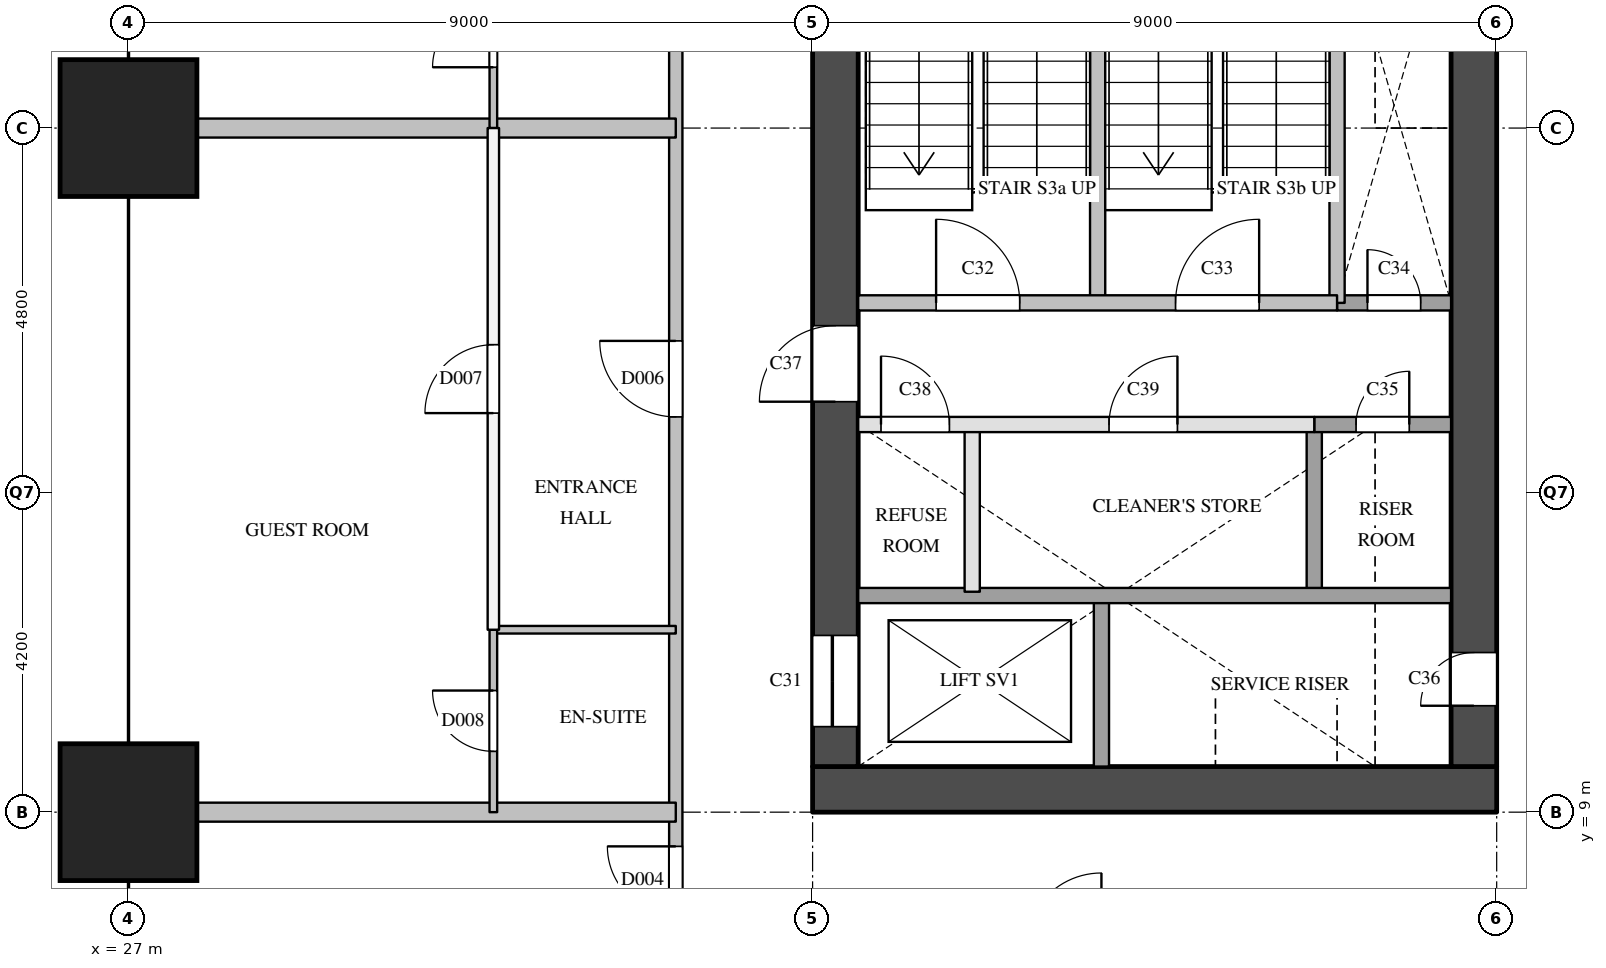
"""IFC4 building model, lengths in metres.
Left out: names, types, materials, properties, quantities, classifications, styles, units other than length and angle.
Written with IfcOpenShell. Run it as: python <this file> out.ifc"""

import sys

from ifc_helpers import new_model, si_unit, direction, frame, frame_2d, origin, origin_2d, place, context, subcontext, project, spatial, rectangle, extrude, element, fill, save


model = new_model("IFC4")
c1 = context("Model", 3, precision=1e-05, world=origin(), true_north=direction((0.0, 1.0)))
c2 = subcontext(c1, "Body", "Model", "MODEL_VIEW")
j1 = project(units=[si_unit("LENGTHUNIT", "METRE"), si_unit("PLANEANGLEUNIT", "RADIAN")], contexts=[c1])
p1 = place(None, origin())
s1 = spatial("IfcSite", under=j1, at=p1, CompositionType="ELEMENT")
p2 = place(p1, origin())
s2 = spatial("IfcBuilding", under=s1, at=p2, CompositionType="ELEMENT")
p3 = place(p2, frame((0.0, 0.0, 96.8)))
s3 = spatial("IfcBuildingStorey", under=s2, at=p3, CompositionType="ELEMENT", Elevation=96.8)
for number, where, z_axis, x_axis in (
    (1, (27.0, 9.0, 0.0), (0.0, 0.0, 1.0), (1.0, 0.0, 0.0)),
    (2, (27.0, 18.0, 0.0), (0.0, 0.0, 1.0), (1.0, 0.0, 0.0)),
):
    element("IfcColumn", number, at=place(p3, frame(where, z_axis=z_axis, x_axis=x_axis)), inside=s3, PredefinedType="COLUMN", context=c2, shape_type="SweptSolid", body=[
        extrude(rectangle(XDim=1.8, YDim=1.8, at=origin_2d()), origin(), (0.0, 0.0, 1.0), 3.8),
    ])
p4 = place(p3, frame((36.0, 9.3, 0.0), z_axis=(0.0, 0.0, 1.0), x_axis=(1.0, 0.0, 0.0)))
e3 = element("IfcWall", 3, at=p4, inside=s3, PredefinedType="SHEAR", context=c2, shape_type="SweptSolid", body=[
    extrude(rectangle(XDim=9.0, YDim=0.6, at=frame_2d((4.5, 0.0))), origin(), (0.0, 0.0, 1.0), 3.5),
])
p5 = place(p3, frame((36.3, 9.6, 0.0), z_axis=(0.0, 0.0, 1.0), x_axis=(0.0, 1.0, 0.0)))
e4 = element("IfcWall", 4, at=p5, inside=s3, PredefinedType="SHEAR", context=c2, shape_type="SweptSolid", body=[
    extrude(rectangle(XDim=12.3, YDim=0.6, at=frame_2d((6.15, 0.0))), origin(), (0.0, 0.0, 1.0), 3.5),
])
p6 = place(p5, frame((0.525, 0.0, 0.0)))
e5 = element("IfcOpeningElement", 5, at=p6, cuts=e4, PredefinedType="OPENING", context=c2, shape_type="SweptSolid", body=[
    extrude(rectangle(XDim=1.2, YDim=2.1, at=frame_2d((0.6, 1.05))), frame((0.0, 0.31, 0.0), z_axis=(0.0, -1.0, 0.0), x_axis=(1.0, 0.0, 0.0)), (0.0, 0.0, 1.0), 0.62),
])
p7 = place(p5, frame((4.8, 0.0, 0.0)))
e6 = element("IfcOpeningElement", 6, at=p7, cuts=e4, PredefinedType="OPENING", context=c2, shape_type="SweptSolid", body=[
    extrude(rectangle(XDim=1.0, YDim=2.1, at=frame_2d((0.5, 1.05))), frame((0.0, 0.31, 0.0), z_axis=(0.0, -1.0, 0.0), x_axis=(1.0, 0.0, 0.0)), (0.0, 0.0, 1.0), 0.62),
])
p8 = place(p3, frame((44.7, 9.6, 0.0), z_axis=(0.0, 0.0, 1.0), x_axis=(0.0, 1.0, 0.0)))
e7 = element("IfcWall", 7, at=p8, inside=s3, PredefinedType="SHEAR", context=c2, shape_type="SweptSolid", body=[
    extrude(rectangle(XDim=12.3, YDim=0.6, at=frame_2d((6.15, 0.0))), origin(), (0.0, 0.0, 1.0), 3.5),
])
p9 = place(p8, frame((0.8, 0.0, 0.0)))
e8 = element("IfcOpeningElement", 8, at=p9, cuts=e7, PredefinedType="OPENING", context=c2, shape_type="SweptSolid", body=[
    extrude(rectangle(XDim=0.7, YDim=2.1, at=frame_2d((0.35, 1.05))), frame((0.0, 0.31, 0.0), z_axis=(0.0, -1.0, 0.0), x_axis=(1.0, 0.0, 0.0)), (0.0, 0.0, 1.0), 0.62),
])
p10 = place(p3, frame((38.1, 11.9, 0.0), z_axis=(0.0, 0.0, 1.0), x_axis=(0.0, 1.0, 0.0)))
e9 = element("IfcWall", 9, at=p10, inside=s3, PredefinedType="PARTITIONING", context=c2, shape_type="SweptSolid", body=[
    extrude(rectangle(XDim=2.2, YDim=0.2, at=frame_2d((1.1, 0.0))), origin(), (0.0, 0.0, 1.0), 3.5),
])
p11 = place(p3, frame((39.75, 15.7, 0.0), z_axis=(0.0, 0.0, 1.0), x_axis=(0.0, 1.0, 0.0)))
e10 = element("IfcWall", 10, at=p11, inside=s3, PredefinedType="SOLIDWALL", context=c2, shape_type="SweptSolid", body=[
    extrude(rectangle(XDim=4.3, YDim=0.2, at=frame_2d((2.15, 0.0))), origin(), (0.0, 0.0, 1.0), 3.5),
])
p12 = place(p3, frame((39.8, 9.6, 0.0), z_axis=(0.0, 0.0, 1.0), x_axis=(0.0, 1.0, 0.0)))
e11 = element("IfcWall", 11, at=p12, inside=s3, PredefinedType="SOLIDWALL", context=c2, shape_type="SweptSolid", body=[
    extrude(rectangle(XDim=2.3, YDim=0.2, at=frame_2d((1.15, 0.0))), origin(), (0.0, 0.0, 1.0), 3.5),
])
p13 = place(p3, frame((42.6, 11.9, 0.0), z_axis=(0.0, 0.0, 1.0), x_axis=(0.0, 1.0, 0.0)))
e12 = element("IfcWall", 12, at=p13, inside=s3, PredefinedType="SOLIDWALL", context=c2, shape_type="SweptSolid", body=[
    extrude(rectangle(XDim=2.2, YDim=0.2, at=frame_2d((1.1, 0.0))), origin(), (0.0, 0.0, 1.0), 3.5),
])
p14 = place(p3, frame((42.9, 15.7, 0.0), z_axis=(0.0, 0.0, 1.0), x_axis=(0.0, 1.0, 0.0)))
e13 = element("IfcWall", 13, at=p14, inside=s3, PredefinedType="SOLIDWALL", context=c2, shape_type="SweptSolid", body=[
    extrude(rectangle(XDim=4.3, YDim=0.2, at=frame_2d((2.15, 0.0))), origin(), (0.0, 0.0, 1.0), 3.5),
])
p15 = place(p3, frame((36.6, 11.85, 0.0), z_axis=(0.0, 0.0, 1.0), x_axis=(1.0, 0.0, 0.0)))
e14 = element("IfcWall", 14, at=p15, inside=s3, PredefinedType="SOLIDWALL", context=c2, shape_type="SweptSolid", body=[
    extrude(rectangle(XDim=7.8, YDim=0.2, at=frame_2d((3.9, 0.0))), origin(), (0.0, 0.0, 1.0), 3.5),
])
p16 = place(p3, frame((36.6, 14.1, 0.0), z_axis=(0.0, 0.0, 1.0), x_axis=(1.0, 0.0, 0.0)))
e15 = element("IfcWall", 15, at=p16, inside=s3, PredefinedType="PARTITIONING", context=c2, shape_type="SweptSolid", body=[
    extrude(rectangle(XDim=6.0, YDim=0.2, at=frame_2d((3.0, 0.0))), origin(), (0.0, 0.0, 1.0), 3.5),
])
p17 = place(p16, frame((0.3, 0.0, 0.0)))
e16 = element("IfcOpeningElement", 16, at=p17, cuts=e15, PredefinedType="OPENING", context=c2, shape_type="SweptSolid", body=[
    extrude(rectangle(XDim=0.9, YDim=2.1, at=frame_2d((0.45, 1.05))), frame((0.0, 0.11, 0.0), z_axis=(0.0, -1.0, 0.0), x_axis=(1.0, 0.0, 0.0)), (0.0, 0.0, 1.0), 0.22),
])
p18 = place(p16, frame((3.3, 0.0, 0.0)))
e17 = element("IfcOpeningElement", 17, at=p18, cuts=e15, PredefinedType="OPENING", context=c2, shape_type="SweptSolid", body=[
    extrude(rectangle(XDim=0.9, YDim=2.1, at=frame_2d((0.45, 1.05))), frame((0.0, 0.11, 0.0), z_axis=(0.0, -1.0, 0.0), x_axis=(1.0, 0.0, 0.0)), (0.0, 0.0, 1.0), 0.22),
])
p19 = place(p3, frame((42.6, 14.1, 0.0), z_axis=(0.0, 0.0, 1.0), x_axis=(1.0, 0.0, 0.0)))
e18 = element("IfcWall", 18, at=p19, inside=s3, PredefinedType="SOLIDWALL", context=c2, shape_type="SweptSolid", body=[
    extrude(rectangle(XDim=1.8, YDim=0.2, at=frame_2d((0.9, 0.0))), origin(), (0.0, 0.0, 1.0), 3.5),
])
p20 = place(p19, frame((0.55, 0.0, 0.0)))
e19 = element("IfcOpeningElement", 19, at=p20, cuts=e18, PredefinedType="OPENING", context=c2, shape_type="SweptSolid", body=[
    extrude(rectangle(XDim=0.7, YDim=2.1, at=frame_2d((0.35, 1.05))), frame((0.0, 0.11, 0.0), z_axis=(0.0, -1.0, 0.0), x_axis=(1.0, 0.0, 0.0)), (0.0, 0.0, 1.0), 0.22),
])
p21 = place(p3, frame((42.9, 15.7, 0.0), z_axis=(0.0, 0.0, 1.0), x_axis=(1.0, 0.0, 0.0)))
e20 = element("IfcWall", 20, at=p21, inside=s3, PredefinedType="SOLIDWALL", context=c2, shape_type="SweptSolid", body=[
    extrude(rectangle(XDim=1.5, YDim=0.2, at=frame_2d((0.75, 0.0))), origin(), (0.0, 0.0, 1.0), 3.5),
])
p22 = place(p21, frame((0.4, 0.0, 0.0)))
e21 = element("IfcOpeningElement", 21, at=p22, cuts=e20, PredefinedType="OPENING", context=c2, shape_type="SweptSolid", body=[
    extrude(rectangle(XDim=0.7, YDim=2.1, at=frame_2d((0.35, 1.05))), frame((0.0, 0.11, 0.0), z_axis=(0.0, -1.0, 0.0), x_axis=(1.0, 0.0, 0.0)), (0.0, 0.0, 1.0), 0.22),
])
p23 = place(p3, frame((36.6, 15.7, 0.0), z_axis=(0.0, 0.0, 1.0), x_axis=(1.0, 0.0, 0.0)))
e22 = element("IfcWall", 22, at=p23, inside=s3, PredefinedType="SOLIDWALL", context=c2, shape_type="SweptSolid", body=[
    extrude(rectangle(XDim=6.3, YDim=0.2, at=frame_2d((3.15, 0.0))), origin(), (0.0, 0.0, 1.0), 3.5),
])
p24 = place(p23, frame((1.025, 0.0, 0.0)))
e23 = element("IfcOpeningElement", 23, at=p24, cuts=e22, PredefinedType="OPENING", context=c2, shape_type="SweptSolid", body=[
    extrude(rectangle(XDim=1.1, YDim=2.1, at=frame_2d((0.55, 1.05))), frame((0.0, 0.11, 0.0), z_axis=(0.0, -1.0, 0.0), x_axis=(1.0, 0.0, 0.0)), (0.0, 0.0, 1.0), 0.22),
])
p25 = place(p23, frame((4.175, 0.0, 0.0)))
e24 = element("IfcOpeningElement", 24, at=p25, cuts=e22, PredefinedType="OPENING", context=c2, shape_type="SweptSolid", body=[
    extrude(rectangle(XDim=1.1, YDim=2.1, at=frame_2d((0.55, 1.05))), frame((0.0, 0.11, 0.0), z_axis=(0.0, -1.0, 0.0), x_axis=(1.0, 0.0, 0.0)), (0.0, 0.0, 1.0), 0.22),
])
p26 = place(p3, frame((34.2, 7.2, 0.0), z_axis=(0.0, 0.0, 1.0), x_axis=(0.0, 1.0, 0.0)))
e25 = element("IfcWall", 25, at=p26, inside=s3, PredefinedType="PARTITIONING", context=c2, shape_type="SweptSolid", body=[
    extrude(rectangle(XDim=16.49, YDim=0.175, at=frame_2d((8.245, 0.0))), origin(), (0.0, 0.0, 1.0), 3.5),
])
p27 = place(p26, frame((0.45, 0.0, 0.0)))
e26 = element("IfcOpeningElement", 26, at=p27, cuts=e25, PredefinedType="OPENING", context=c2, shape_type="SweptSolid", body=[
    extrude(rectangle(XDim=0.9, YDim=2.1, at=frame_2d((0.45, 1.05))), frame((0.0, 0.097, 0.0), z_axis=(0.0, -1.0, 0.0), x_axis=(1.0, 0.0, 0.0)), (0.0, 0.0, 1.0), 0.195),
])
p28 = place(p26, frame((7.0, 0.0, 0.0)))
e27 = element("IfcOpeningElement", 27, at=p28, cuts=e25, PredefinedType="OPENING", context=c2, shape_type="SweptSolid", body=[
    extrude(rectangle(XDim=1.0, YDim=2.1, at=frame_2d((0.5, 1.05))), frame((0.0, 0.097, 0.0), z_axis=(0.0, -1.0, 0.0), x_axis=(1.0, 0.0, 0.0)), (0.0, 0.0, 1.0), 0.195),
])
p29 = place(p26, frame((14.345, 0.0, 0.0)))
e28 = element("IfcOpeningElement", 28, at=p29, cuts=e25, PredefinedType="OPENING", context=c2, shape_type="SweptSolid", body=[
    extrude(rectangle(XDim=1.0, YDim=2.1, at=frame_2d((0.5, 1.05))), frame((0.0, 0.097, 0.0), z_axis=(0.0, -1.0, 0.0), x_axis=(1.0, 0.0, 0.0)), (0.0, 0.0, 1.0), 0.195),
])
p30 = place(p3, frame((31.8, 11.4, 0.0), z_axis=(0.0, 0.0, 1.0), x_axis=(0.0, 1.0, 0.0)))
e29 = element("IfcWall", 29, at=p30, inside=s3, PredefinedType="PARTITIONING", context=c2, shape_type="SweptSolid", body=[
    extrude(rectangle(XDim=6.6, YDim=0.15, at=frame_2d((3.3, 0.0))), origin(), (0.0, 0.0, 1.0), 3.5),
])
p31 = place(p30, frame((2.85, 0.0, 0.0)))
e30 = element("IfcOpeningElement", 30, at=p31, cuts=e29, PredefinedType="OPENING", context=c2, shape_type="SweptSolid", body=[
    extrude(rectangle(XDim=0.9, YDim=2.1, at=frame_2d((0.45, 1.05))), frame((0.0, 0.085, 0.0), z_axis=(0.0, -1.0, 0.0), x_axis=(1.0, 0.0, 0.0)), (0.0, 0.0, 1.0), 0.17),
])
for number, where, z_axis, x_axis in (
    (31, (27.0, 9.0, 0.0), (0.0, 0.0, 1.0), (1.0, 0.0, 0.0)),
    (32, (27.0, 18.0, 0.0), (0.0, 0.0, 1.0), (1.0, 0.0, 0.0)),
):
    element("IfcWall", number, at=place(p3, frame(where, z_axis=z_axis, x_axis=x_axis)), inside=s3, PredefinedType="PARTITIONING", context=c2, shape_type="SweptSolid", body=[
        extrude(rectangle(XDim=7.2, YDim=0.25, at=frame_2d((3.6, 0.0))), origin(), (0.0, 0.0, 1.0), 3.5),
    ])
p32 = place(p3, frame((31.8, 11.4, 0.0), z_axis=(0.0, 0.0, 1.0), x_axis=(1.0, 0.0, 0.0)))
e33 = element("IfcWall", 33, at=p32, inside=s3, PredefinedType="PARTITIONING", context=c2, shape_type="SweptSolid", body=[
    extrude(rectangle(XDim=2.4, YDim=0.1, at=frame_2d((1.2, 0.0))), origin(), (0.0, 0.0, 1.0), 3.5),
])
p33 = place(p3, frame((31.8, 9.0, 0.0), z_axis=(0.0, 0.0, 1.0), x_axis=(0.0, 1.0, 0.0)))
e34 = element("IfcWall", 34, at=p33, inside=s3, PredefinedType="PARTITIONING", context=c2, shape_type="SweptSolid", body=[
    extrude(rectangle(XDim=2.4, YDim=0.1, at=frame_2d((1.2, 0.0))), origin(), (0.0, 0.0, 1.0), 3.5),
])
p34 = place(p33, frame((0.8, 0.0, 0.0)))
e35 = element("IfcOpeningElement", 35, at=p34, cuts=e34, PredefinedType="OPENING", context=c2, shape_type="SweptSolid", body=[
    extrude(rectangle(XDim=0.8, YDim=2.1, at=frame_2d((0.4, 1.05))), frame((0.0, 0.06, 0.0), z_axis=(0.0, -1.0, 0.0), x_axis=(1.0, 0.0, 0.0)), (0.0, 0.0, 1.0), 0.12),
])
p35 = place(p3, frame((31.8, 18.0, 0.0), z_axis=(0.0, 0.0, 1.0), x_axis=(0.0, 1.0, 0.0)))
e36 = element("IfcWall", 36, at=p35, inside=s3, PredefinedType="PARTITIONING", context=c2, shape_type="SweptSolid", body=[
    extrude(rectangle(XDim=2.4, YDim=0.1, at=frame_2d((1.2, 0.0))), origin(), (0.0, 0.0, 1.0), 3.5),
])
p36 = place(p35, frame((0.8, 0.0, 0.0)))
e37 = element("IfcOpeningElement", 37, at=p36, cuts=e36, PredefinedType="OPENING", context=c2, shape_type="SweptSolid", body=[
    extrude(rectangle(XDim=0.8, YDim=2.1, at=frame_2d((0.4, 1.05))), frame((0.0, 0.06, 0.0), z_axis=(0.0, -1.0, 0.0), x_axis=(1.0, 0.0, 0.0)), (0.0, 0.0, 1.0), 0.12),
])
p37 = place(p6, origin())
e38 = element("IfcDoor", 38, at=p37, inside=s3, OperationType="SLIDING_TO_LEFT", PredefinedType="DOOR", context=c2, shape_type="SweptSolid", body=[
    extrude(rectangle(XDim=1.2, YDim=2.1, at=frame_2d((0.6, 1.05))), frame((0.0, 0.025, 0.0), z_axis=(0.0, -1.0, 0.0), x_axis=(1.0, 0.0, 0.0)), (0.0, 0.0, 1.0), 0.05),
])
fill(e5, e38)
p38 = place(p24, origin())
e39 = element("IfcDoor", 39, at=p38, inside=s3, OperationType="SINGLE_SWING_LEFT", PredefinedType="DOOR", context=c2, shape_type="SweptSolid", body=[
    extrude(rectangle(XDim=1.1, YDim=2.1, at=frame_2d((0.55, 1.05))), frame((0.0, 0.025, 0.0), z_axis=(0.0, -1.0, 0.0), x_axis=(1.0, 0.0, 0.0)), (0.0, 0.0, 1.0), 0.05),
])
fill(e23, e39)
p39 = place(p25, origin())
e40 = element("IfcDoor", 40, at=p39, inside=s3, OperationType="SINGLE_SWING_RIGHT", PredefinedType="DOOR", context=c2, shape_type="SweptSolid", body=[
    extrude(rectangle(XDim=1.1, YDim=2.1, at=frame_2d((0.55, 1.05))), frame((0.0, 0.025, 0.0), z_axis=(0.0, -1.0, 0.0), x_axis=(1.0, 0.0, 0.0)), (0.0, 0.0, 1.0), 0.05),
])
fill(e24, e40)
p40 = place(p22, origin())
e41 = element("IfcDoor", 41, at=p40, inside=s3, OperationType="SINGLE_SWING_LEFT", PredefinedType="DOOR", context=c2, shape_type="SweptSolid", body=[
    extrude(rectangle(XDim=0.7, YDim=2.1, at=frame_2d((0.35, 1.05))), frame((0.0, 0.025, 0.0), z_axis=(0.0, -1.0, 0.0), x_axis=(1.0, 0.0, 0.0)), (0.0, 0.0, 1.0), 0.05),
])
fill(e21, e41)
p41 = place(p20, origin())
e42 = element("IfcDoor", 42, at=p41, inside=s3, OperationType="SINGLE_SWING_RIGHT", PredefinedType="DOOR", context=c2, shape_type="SweptSolid", body=[
    extrude(rectangle(XDim=0.7, YDim=2.1, at=frame_2d((0.35, 1.05))), frame((0.0, 0.025, 0.0), z_axis=(0.0, -1.0, 0.0), x_axis=(1.0, 0.0, 0.0)), (0.0, 0.0, 1.0), 0.05),
])
fill(e19, e42)
p42 = place(p9, origin())
e43 = element("IfcDoor", 43, at=p42, inside=s3, OperationType="SINGLE_SWING_LEFT", PredefinedType="DOOR", context=c2, shape_type="SweptSolid", body=[
    extrude(rectangle(XDim=0.7, YDim=2.1, at=frame_2d((0.35, 1.05))), frame((0.0, 0.025, 0.0), z_axis=(0.0, -1.0, 0.0), x_axis=(1.0, 0.0, 0.0)), (0.0, 0.0, 1.0), 0.05),
])
fill(e8, e43)
p43 = place(p7, origin())
e44 = element("IfcDoor", 44, at=p43, inside=s3, OperationType="SINGLE_SWING_LEFT", PredefinedType="DOOR", context=c2, shape_type="SweptSolid", body=[
    extrude(rectangle(XDim=1.0, YDim=2.1, at=frame_2d((0.5, 1.05))), frame((0.0, 0.025, 0.0), z_axis=(0.0, -1.0, 0.0), x_axis=(1.0, 0.0, 0.0)), (0.0, 0.0, 1.0), 0.05),
])
fill(e6, e44)
p44 = place(p17, origin())
e45 = element("IfcDoor", 45, at=p44, inside=s3, OperationType="SINGLE_SWING_LEFT", PredefinedType="DOOR", context=c2, shape_type="SweptSolid", body=[
    extrude(rectangle(XDim=0.9, YDim=2.1, at=frame_2d((0.45, 1.05))), frame((0.0, 0.025, 0.0), z_axis=(0.0, -1.0, 0.0), x_axis=(1.0, 0.0, 0.0)), (0.0, 0.0, 1.0), 0.05),
])
fill(e16, e45)
p45 = place(p18, origin())
e46 = element("IfcDoor", 46, at=p45, inside=s3, OperationType="SINGLE_SWING_RIGHT", PredefinedType="DOOR", context=c2, shape_type="SweptSolid", body=[
    extrude(rectangle(XDim=0.9, YDim=2.1, at=frame_2d((0.45, 1.05))), frame((0.0, 0.025, 0.0), z_axis=(0.0, -1.0, 0.0), x_axis=(1.0, 0.0, 0.0)), (0.0, 0.0, 1.0), 0.05),
])
fill(e17, e46)
p46 = place(p27, origin())
e47 = element("IfcDoor", 47, at=p46, inside=s3, OperationType="SINGLE_SWING_RIGHT", PredefinedType="DOOR", context=c2, shape_type="SweptSolid", body=[
    extrude(rectangle(XDim=0.9, YDim=2.1, at=frame_2d((0.45, 1.05))), frame((0.0, 0.025, 0.0), z_axis=(0.0, -1.0, 0.0), x_axis=(1.0, 0.0, 0.0)), (0.0, 0.0, 1.0), 0.05),
])
fill(e26, e47)
p47 = place(p28, origin())
e48 = element("IfcDoor", 48, at=p47, inside=s3, OperationType="SINGLE_SWING_RIGHT", PredefinedType="DOOR", context=c2, shape_type="SweptSolid", body=[
    extrude(rectangle(XDim=1.0, YDim=2.1, at=frame_2d((0.5, 1.05))), frame((0.0, 0.025, 0.0), z_axis=(0.0, -1.0, 0.0), x_axis=(1.0, 0.0, 0.0)), (0.0, 0.0, 1.0), 0.05),
])
fill(e27, e48)
p48 = place(p31, origin())
e49 = element("IfcDoor", 49, at=p48, inside=s3, OperationType="SINGLE_SWING_LEFT", PredefinedType="DOOR", context=c2, shape_type="SweptSolid", body=[
    extrude(rectangle(XDim=0.9, YDim=2.1, at=frame_2d((0.45, 1.05))), frame((0.0, 0.025, 0.0), z_axis=(0.0, -1.0, 0.0), x_axis=(1.0, 0.0, 0.0)), (0.0, 0.0, 1.0), 0.05),
])
fill(e30, e49)
p49 = place(p34, origin())
e50 = element("IfcDoor", 50, at=p49, inside=s3, OperationType="SINGLE_SWING_RIGHT", PredefinedType="DOOR", context=c2, shape_type="SweptSolid", body=[
    extrude(rectangle(XDim=0.8, YDim=2.1, at=frame_2d((0.4, 1.05))), frame((0.0, 0.025, 0.0), z_axis=(0.0, -1.0, 0.0), x_axis=(1.0, 0.0, 0.0)), (0.0, 0.0, 1.0), 0.05),
])
fill(e35, e50)
p50 = place(p36, origin())
e51 = element("IfcDoor", 51, at=p50, inside=s3, OperationType="SINGLE_SWING_LEFT", PredefinedType="DOOR", context=c2, shape_type="SweptSolid", body=[
    extrude(rectangle(XDim=0.8, YDim=2.1, at=frame_2d((0.4, 1.05))), frame((0.0, 0.025, 0.0), z_axis=(0.0, -1.0, 0.0), x_axis=(1.0, 0.0, 0.0)), (0.0, 0.0, 1.0), 0.05),
])
fill(e37, e51)
save(model, sys.argv[1])
